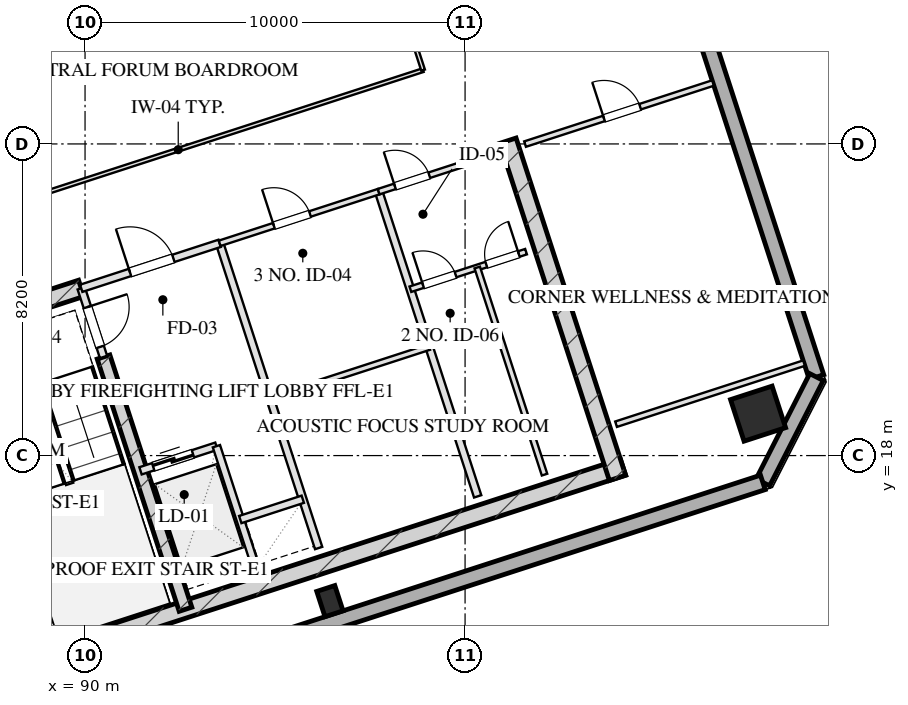
"""IFC4 building model, lengths in metres.
Left out: names, types, materials, properties, quantities, classifications, styles, units other than length and angle.
Written with IfcOpenShell. Run it as: python <this file> out.ifc"""

import sys

from ifc_helpers import new_model, si_unit, direction, frame, frame_2d, origin, origin_2d, place, context, subcontext, project, spatial, rectangle, hollow_rectangle, extrude, element, fill, save


model = new_model("IFC4")
c1 = context("Model", 3, precision=1e-05, world=origin(), true_north=direction((0.0, 1.0)))
c2 = subcontext(c1, "Body", "Model", "MODEL_VIEW")
j1 = project(units=[si_unit("LENGTHUNIT", "METRE"), si_unit("PLANEANGLEUNIT", "RADIAN")], contexts=[c1])
p1 = place(None, origin())
s1 = spatial("IfcSite", under=j1, at=p1, CompositionType="ELEMENT")
p2 = place(p1, origin())
s2 = spatial("IfcBuilding", under=s1, at=p2, CompositionType="ELEMENT")
p3 = place(p2, frame((0.0, 0.0, 209.3)))
s3 = spatial("IfcBuildingStorey", under=s2, at=p3, CompositionType="ELEMENT", Elevation=209.3)
p4 = place(p3, frame((88.701, 12.675, 0.0), z_axis=(0.0, 0.0, 1.0), x_axis=(0.95105824505, 0.309011673763, 0.0)))
e1 = element("IfcWall", 1, at=p4, inside=s3, PredefinedType="SHEAR", context=c2, shape_type="SweptSolid", body=[
    extrude(rectangle(XDim=16.25, YDim=0.45, at=frame_2d((8.125, 0.0))), origin(), (0.0, 0.0, 1.0), 3.45),
])
for number, where, z_axis, x_axis in (
    (2, (86.102, 21.404, 0.0), (0.0, 0.0, 1.0), (0.309, -0.951, 0.0)),
    (3, (101.128, 26.286, 0.0), (0.0, 0.0, 1.0), (0.309, -0.951, 0.0)),
):
    element("IfcWall", number, at=place(p3, frame(where, z_axis=z_axis, x_axis=x_axis)), inside=s3, PredefinedType="SHEAR", context=c2, shape_type="SweptSolid", body=[
        extrude(rectangle(XDim=9.33, YDim=0.45, at=frame_2d((4.665, 0.0))), origin(), (0.0, 0.0, 1.0), 3.45),
    ])
p5 = place(p3, frame((90.486, 20.594, 0.0), z_axis=(0.0, 0.0, 1.0), x_axis=(0.309020428229, -0.951055400562, 0.0)))
e4 = element("IfcWall", 4, at=p5, inside=s3, PredefinedType="SHEAR", context=c2, shape_type="SweptSolid", body=[
    extrude(rectangle(XDim=6.98, YDim=0.35, at=frame_2d((3.49, 0.0))), origin(), (0.0, 0.0, 1.0), 3.45),
])
p6 = place(p3, frame((85.957, 21.12, 0.0), z_axis=(0.0, 0.0, 1.0), x_axis=(0.951064796122, 0.308991510526, 0.0)))
e5 = element("IfcWall", 5, at=p6, inside=s3, PredefinedType="SHEAR", context=c2, shape_type="SweptSolid", body=[
    extrude(rectangle(XDim=4.145, YDim=0.45, at=frame_2d((2.073, 0.0))), origin(), (0.0, 0.0, 1.0), 3.45),
])
p7 = place(p3, frame((107.71, 19.104, 0.0), z_axis=(0.0, 0.0, 1.0), x_axis=(0.951056516295, 0.309016994375, 0.0)))
e6 = element("IfcColumn", 6, at=p7, inside=s3, PredefinedType="COLUMN", context=c2, shape_type="SweptSolid", body=[
    extrude(hollow_rectangle(XDim=1.15, YDim=1.15, WallThickness=0.04, at=origin_2d()), origin(), (0.0, 0.0, 1.0), 3.451),
])
p8 = place(p3, frame((96.443, 14.17, 0.0), z_axis=(0.0, 0.0, 1.0), x_axis=(0.951056516295, 0.309016994375, 0.0)))
e7 = element("IfcColumn", 7, at=p8, inside=s3, PredefinedType="COLUMN", context=c2, shape_type="SweptSolid", body=[
    extrude(hollow_rectangle(XDim=0.5, YDim=0.7, WallThickness=0.025, at=origin_2d()), origin(), (0.0, 0.0, 1.0), 3.451),
])
p9 = place(p3, frame((97.382, 56.586, 0.0), z_axis=(0.0, 0.0, 1.0), x_axis=(0.309016491071, -0.951056679828, 0.0)))
e8 = element("IfcWall", 8, at=p9, inside=s3, PredefinedType="SOLIDWALL", context=c2, shape_type="SweptSolid", body=[
    extrude(rectangle(XDim=38.4, YDim=0.4, at=frame_2d((19.2, 0.0))), origin(), (0.0, 0.0, 1.0), 2.61),
])
p10 = place(p9, frame((15.55, 0.0, 0.75)))
e9 = element("IfcOpeningElement", 9, at=p10, cuts=e8, PredefinedType="OPENING", context=c2, shape_type="SweptSolid", body=[
    extrude(rectangle(XDim=2.1, YDim=1.46, at=frame_2d((1.05, 0.73))), frame((0.0, 0.21, 0.0), z_axis=(0.0, -1.0, 0.0), x_axis=(1.0, 0.0, 0.0)), (0.0, 0.0, 1.0), 0.42),
])
p11 = place(p9, frame((11.75, 0.0, 0.75)))
e10 = element("IfcOpeningElement", 10, at=p11, cuts=e8, PredefinedType="OPENING", context=c2, shape_type="SweptSolid", body=[
    extrude(rectangle(XDim=2.1, YDim=1.46, at=frame_2d((1.05, 0.73))), frame((0.0, 0.21, 0.0), z_axis=(0.0, -1.0, 0.0), x_axis=(1.0, 0.0, 0.0)), (0.0, 0.0, 1.0), 0.42),
])
p12 = place(p9, frame((23.05, 0.0, 0.0)))
e11 = element("IfcOpeningElement", 11, at=p12, cuts=e8, PredefinedType="OPENING", context=c2, shape_type="SweptSolid", body=[
    extrude(rectangle(XDim=1.1, YDim=2.15, at=frame_2d((0.55, 1.075))), frame((0.0, 0.21, 0.0), z_axis=(0.0, -1.0, 0.0), x_axis=(1.0, 0.0, 0.0)), (0.0, 0.0, 1.0), 0.42),
])
p13 = place(p3, frame((109.248, 20.066, 0.0), z_axis=(0.0, 0.0, 1.0), x_axis=(-0.453949291228, -0.891027519774, 0.0)))
e12 = element("IfcWall", 12, at=p13, inside=s3, PredefinedType="SOLIDWALL", context=c2, shape_type="SweptSolid", body=[
    extrude(rectangle(XDim=3.111, YDim=0.4, at=frame_2d((1.556, 0.0))), origin(), (0.0, 0.0, 1.0), 2.61),
])
p14 = place(p3, frame((107.835, 17.294, 0.0), z_axis=(0.0, 0.0, 1.0), x_axis=(-0.951058012937, -0.309012388148, 0.0)))
e13 = element("IfcWall", 13, at=p14, inside=s3, PredefinedType="SOLIDWALL", context=c2, shape_type="SweptSolid", body=[
    extrude(rectangle(XDim=23.6, YDim=0.4, at=frame_2d((11.8, 0.0))), origin(), (0.0, 0.0, 1.0), 2.61),
])
p15 = place(p3, frame((89.899, 22.401, 0.0), z_axis=(0.0, 0.0, 1.0), x_axis=(0.308932062672, -0.951084108086, 0.0)))
e14 = element("IfcWall", 14, at=p15, inside=s3, PredefinedType="PARTITIONING", context=c2, shape_type="SweptSolid", body=[
    extrude(rectangle(XDim=1.9, YDim=0.2, at=frame_2d((0.95, 0.0))), origin(), (0.0, 0.0, 1.0), 3.175),
])
p16 = place(p15, frame((0.52, 0.0, 0.0)))
e15 = element("IfcOpeningElement", 15, at=p16, cuts=e14, PredefinedType="OPENING", context=c2, shape_type="SweptSolid", body=[
    extrude(rectangle(XDim=1.1, YDim=2.05, at=frame_2d((0.55, 1.025))), frame((0.0, 0.11, 0.0), z_axis=(0.0, -1.0, 0.0), x_axis=(1.0, 0.0, 0.0)), (0.0, 0.0, 1.0), 0.22),
])
p17 = place(p3, frame((93.542, 23.585, 0.0), z_axis=(0.0, 0.0, 1.0), x_axis=(0.309042196757, -0.951048327176, 0.0)))
e16 = element("IfcWall", 16, at=p17, inside=s3, PredefinedType="PARTITIONING", context=c2, shape_type="SweptSolid", body=[
    extrude(rectangle(XDim=8.43, YDim=0.2, at=frame_2d((4.215, 0.0))), origin(), (0.0, 0.0, 1.0), 3.175),
])
p18 = place(p3, frame((89.899, 22.401, 0.0), z_axis=(0.0, 0.0, 1.0), x_axis=(0.951046716504, 0.309047153403, 0.0)))
e17 = element("IfcWall", 17, at=p18, inside=s3, PredefinedType="PARTITIONING", context=c2, shape_type="SweptSolid", body=[
    extrude(rectangle(XDim=3.83, YDim=0.2, at=frame_2d((1.915, 0.0))), origin(), (0.0, 0.0, 1.0), 3.175),
])
p19 = place(p18, frame((1.35, 0.0, 0.0)))
e18 = element("IfcOpeningElement", 18, at=p19, cuts=e17, PredefinedType="OPENING", context=c2, shape_type="SweptSolid", body=[
    extrude(rectangle(XDim=1.2, YDim=2.05, at=frame_2d((0.6, 1.025))), frame((0.0, 0.11, 0.0), z_axis=(0.0, -1.0, 0.0), x_axis=(1.0, 0.0, 0.0)), (0.0, 0.0, 1.0), 0.22),
])
p20 = place(p3, frame((91.46, 17.598, 0.0), z_axis=(0.0, 0.0, 1.0), x_axis=(0.951062257173, 0.308999325213, 0.0)))
e19 = element("IfcWall", 19, at=p20, inside=s3, PredefinedType="PARTITIONING", context=c2, shape_type="SweptSolid", body=[
    extrude(rectangle(XDim=2.1, YDim=0.2, at=frame_2d((1.05, 0.0))), origin(), (0.0, 0.0, 1.0), 3.175),
])
p21 = place(p20, frame((0.35, 0.0, 0.0)))
e20 = element("IfcOpeningElement", 20, at=p21, cuts=e19, PredefinedType="OPENING", context=c2, shape_type="SweptSolid", body=[
    extrude(rectangle(XDim=1.1, YDim=2.05, at=frame_2d((0.55, 1.025))), frame((0.0, 0.11, 0.0), z_axis=(0.0, -1.0, 0.0), x_axis=(1.0, 0.0, 0.0)), (0.0, 0.0, 1.0), 0.22),
])
p22 = place(p3, frame((93.457, 18.247, 0.0), z_axis=(0.0, 0.0, 1.0), x_axis=(0.3089935693, -0.951064127245, 0.0)))
e21 = element("IfcWall", 21, at=p22, inside=s3, PredefinedType="PARTITIONING", context=c2, shape_type="SweptSolid", body=[
    extrude(rectangle(XDim=3.7, YDim=0.2, at=frame_2d((1.85, 0.0))), origin(), (0.0, 0.0, 1.0), 3.175),
])
p23 = place(p3, frame((94.084, 16.317, 0.0), z_axis=(0.0, 0.0, 1.0), x_axis=(0.951041328149, 0.309063734775, 0.0)))
e22 = element("IfcWall", 22, at=p23, inside=s3, PredefinedType="PARTITIONING", context=c2, shape_type="SweptSolid", body=[
    extrude(rectangle(XDim=1.73, YDim=0.2, at=frame_2d((0.865, 0.0))), origin(), (0.0, 0.0, 1.0), 3.175),
])
p24 = place(p3, frame((97.727, 24.944, 0.0), z_axis=(0.0, 0.0, 1.0), x_axis=(0.309016001439, -0.951056838919, 0.0)))
e23 = element("IfcWall", 23, at=p24, inside=s3, PredefinedType="PARTITIONING", context=c2, shape_type="SweptSolid", body=[
    extrude(rectangle(XDim=8.43, YDim=0.2, at=frame_2d((4.215, 0.0))), origin(), (0.0, 0.0, 1.0), 3.175),
])
p25 = place(p3, frame((93.542, 23.585, 0.0), z_axis=(0.0, 0.0, 1.0), x_axis=(0.951063829732, 0.308994485023, 0.0)))
e24 = element("IfcWall", 24, at=p25, inside=s3, PredefinedType="PARTITIONING", context=c2, shape_type="SweptSolid", body=[
    extrude(rectangle(XDim=4.4, YDim=0.15, at=frame_2d((2.2, 0.0))), origin(), (0.0, 0.0, 1.0), 3.175),
])
p26 = place(p25, frame((1.5, 0.0, 0.0)))
e25 = element("IfcOpeningElement", 25, at=p26, cuts=e24, PredefinedType="OPENING", context=c2, shape_type="SweptSolid", body=[
    extrude(rectangle(XDim=1.0, YDim=2.05, at=frame_2d((0.5, 1.025))), frame((0.0, 0.085, 0.0), z_axis=(0.0, -1.0, 0.0), x_axis=(1.0, 0.0, 0.0)), (0.0, 0.0, 1.0), 0.17),
])
p27 = place(p3, frame((94.871, 19.495, 0.0), z_axis=(0.0, 0.0, 1.0), x_axis=(0.951042223598, 0.309060979314, 0.0)))
e26 = element("IfcWall", 26, at=p27, inside=s3, PredefinedType="PARTITIONING", context=c2, shape_type="SweptSolid", body=[
    extrude(rectangle(XDim=4.4, YDim=0.15, at=frame_2d((2.2, 0.0))), origin(), (0.0, 0.0, 1.0), 3.175),
])
p28 = place(p3, frame((97.727, 24.944, 0.0), z_axis=(0.0, 0.0, 1.0), x_axis=(0.951036872128, 0.309077446369, 0.0)))
e27 = element("IfcWall", 27, at=p28, inside=s3, PredefinedType="PARTITIONING", context=c2, shape_type="SweptSolid", body=[
    extrude(rectangle(XDim=3.2, YDim=0.15, at=frame_2d((1.6, 0.0))), origin(), (0.0, 0.0, 1.0), 3.175),
])
p29 = place(p28, frame((0.45, 0.0, 0.0)))
e28 = element("IfcOpeningElement", 28, at=p29, cuts=e27, PredefinedType="OPENING", context=c2, shape_type="SweptSolid", body=[
    extrude(rectangle(XDim=0.95, YDim=2.05, at=frame_2d((0.475, 1.025))), frame((0.0, 0.085, 0.0), z_axis=(0.0, -1.0, 0.0), x_axis=(1.0, 0.0, 0.0)), (0.0, 0.0, 1.0), 0.17),
])
p30 = place(p3, frame((98.561, 22.376, 0.0), z_axis=(0.0, 0.0, 1.0), x_axis=(0.95104415986, 0.309055020985, 0.0)))
e29 = element("IfcWall", 29, at=p30, inside=s3, PredefinedType="PARTITIONING", context=c2, shape_type="SweptSolid", body=[
    extrude(rectangle(XDim=3.2, YDim=0.15, at=frame_2d((1.6, 0.0))), origin(), (0.0, 0.0, 1.0), 3.175),
])
p31 = place(p30, frame((0.35, 0.0, 0.0)))
e30 = element("IfcOpeningElement", 30, at=p31, cuts=e29, PredefinedType="OPENING", context=c2, shape_type="SweptSolid", body=[
    extrude(rectangle(XDim=0.9, YDim=2.05, at=frame_2d((0.45, 1.025))), frame((0.0, 0.085, 0.0), z_axis=(0.0, -1.0, 0.0), x_axis=(1.0, 0.0, 0.0)), (0.0, 0.0, 1.0), 0.17),
])
p32 = place(p30, frame((2.1, 0.0, 0.0)))
e31 = element("IfcOpeningElement", 31, at=p32, cuts=e29, PredefinedType="OPENING", context=c2, shape_type="SweptSolid", body=[
    extrude(rectangle(XDim=0.9, YDim=2.05, at=frame_2d((0.45, 1.025))), frame((0.0, 0.085, 0.0), z_axis=(0.0, -1.0, 0.0), x_axis=(1.0, 0.0, 0.0)), (0.0, 0.0, 1.0), 0.17),
])
p33 = place(p3, frame((100.32, 22.948, 0.0), z_axis=(0.0, 0.0, 1.0), x_axis=(0.309035009867, -0.951050662518, 0.0)))
e32 = element("IfcWall", 32, at=p33, inside=s3, PredefinedType="PARTITIONING", context=c2, shape_type="SweptSolid", body=[
    extrude(rectangle(XDim=5.73, YDim=0.15, at=frame_2d((2.865, 0.0))), origin(), (0.0, 0.0, 1.0), 3.175),
])
p34 = place(p3, frame((103.973, 18.825, 0.0), z_axis=(0.0, 0.0, 1.0), x_axis=(0.951055112834, 0.309021313752, 0.0)))
e33 = element("IfcWall", 33, at=p34, inside=s3, PredefinedType="PARTITIONING", context=c2, shape_type="SweptSolid", body=[
    extrude(rectangle(XDim=5.2, YDim=0.15, at=frame_2d((2.6, 0.0))), origin(), (0.0, 0.0, 1.0), 3.175),
])
p35 = place(p3, frame((101.578, 26.196, 0.0), z_axis=(0.0, 0.0, 1.0), x_axis=(0.951064427824, 0.308992644131, 0.0)))
e34 = element("IfcWall", 34, at=p35, inside=s3, PredefinedType="PARTITIONING", context=c2, shape_type="SweptSolid", body=[
    extrude(rectangle(XDim=5.2, YDim=0.15, at=frame_2d((2.6, 0.0))), origin(), (0.0, 0.0, 1.0), 3.175),
])
p36 = place(p35, frame((2.184, 0.0, 0.0)))
e35 = element("IfcOpeningElement", 35, at=p36, cuts=e34, PredefinedType="OPENING", context=c2, shape_type="SweptSolid", body=[
    extrude(rectangle(XDim=1.0, YDim=2.05, at=frame_2d((0.5, 1.025))), frame((0.0, 0.085, 0.0), z_axis=(0.0, -1.0, 0.0), x_axis=(1.0, 0.0, 0.0)), (0.0, 0.0, 1.0), 0.17),
])
p37 = place(p3, frame((86.009, 23.955, 0.0), z_axis=(0.0, 0.0, 1.0), x_axis=(0.951059488241, 0.309007847517, 0.0)))
e36 = element("IfcWall", 36, at=p37, inside=s3, PredefinedType="MOVABLE", context=c2, shape_type="SweptSolid", body=[
    extrude(rectangle(XDim=13.55, YDim=0.1, at=frame_2d((6.775, 0.0))), origin(), (0.0, 0.0, 1.0), 3.175),
])
p38 = place(p3, frame((98.896, 28.142, 0.0), z_axis=(0.0, 0.0, 1.0), x_axis=(-0.30901773025, 0.951056277195, 0.0)))
e37 = element("IfcWall", 37, at=p38, inside=s3, PredefinedType="MOVABLE", context=c2, shape_type="SweptSolid", body=[
    extrude(rectangle(XDim=16.64, YDim=0.1, at=frame_2d((8.32, 0.0))), origin(), (0.0, 0.0, 1.0), 3.175),
])
p39 = place(p38, frame((7.68, 0.0, 0.0)))
e38 = element("IfcOpeningElement", 38, at=p39, cuts=e37, PredefinedType="OPENING", context=c2, shape_type="SweptSolid", body=[
    extrude(rectangle(XDim=1.1, YDim=2.05, at=frame_2d((0.55, 1.025))), frame((0.0, 0.06, 0.0), z_axis=(0.0, -1.0, 0.0), x_axis=(1.0, 0.0, 0.0)), (0.0, 0.0, 1.0), 0.12),
])
p40 = place(p3, frame((84.674, 28.063, 0.0), z_axis=(0.0, 0.0, 1.0), x_axis=(0.951054192928, 0.309024144872, 0.0)))
e39 = element("IfcWall", 39, at=p40, inside=s3, PredefinedType="MOVABLE", context=c2, shape_type="SweptSolid", body=[
    extrude(rectangle(XDim=13.55, YDim=0.1, at=frame_2d((6.775, 0.0))), origin(), (0.0, 0.0, 1.0), 3.175),
])
p41 = place(p16, origin())
e40 = element("IfcDoor", 40, at=p41, inside=s3, OperationType="SINGLE_SWING_LEFT", PredefinedType="DOOR", context=c2, shape_type="SweptSolid", body=[
    extrude(rectangle(XDim=1.1, YDim=2.05, at=frame_2d((0.55, 1.025))), frame((0.0, 0.025, 0.0), z_axis=(0.0, -1.0, 0.0), x_axis=(1.0, 0.0, 0.0)), (0.0, 0.0, 1.0), 0.05),
])
fill(e15, e40)
p42 = place(p19, origin())
e41 = element("IfcDoor", 41, at=p42, inside=s3, OperationType="SINGLE_SWING_LEFT", PredefinedType="DOOR", context=c2, shape_type="SweptSolid", body=[
    extrude(rectangle(XDim=1.2, YDim=2.05, at=frame_2d((0.6, 1.025))), frame((0.0, 0.025, 0.0), z_axis=(0.0, -1.0, 0.0), x_axis=(1.0, 0.0, 0.0)), (0.0, 0.0, 1.0), 0.05),
])
fill(e18, e41)
p43 = place(p21, origin())
e42 = element("IfcDoor", 42, at=p43, inside=s3, OperationType="DOUBLE_DOOR_SLIDING", PredefinedType="DOOR", context=c2, shape_type="SweptSolid", body=[
    extrude(rectangle(XDim=1.1, YDim=2.05, at=frame_2d((0.55, 1.025))), frame((0.0, 0.025, 0.0), z_axis=(0.0, -1.0, 0.0), x_axis=(1.0, 0.0, 0.0)), (0.0, 0.0, 1.0), 0.05),
])
fill(e20, e42)
p44 = place(p26, origin())
e43 = element("IfcDoor", 43, at=p44, inside=s3, OperationType="SINGLE_SWING_LEFT", PredefinedType="DOOR", context=c2, shape_type="SweptSolid", body=[
    extrude(rectangle(XDim=1.0, YDim=2.05, at=frame_2d((0.5, 1.025))), frame((0.0, 0.025, 0.0), z_axis=(0.0, -1.0, 0.0), x_axis=(1.0, 0.0, 0.0)), (0.0, 0.0, 1.0), 0.05),
])
fill(e25, e43)
p45 = place(p29, origin())
e44 = element("IfcDoor", 44, at=p45, inside=s3, OperationType="SINGLE_SWING_LEFT", PredefinedType="DOOR", context=c2, shape_type="SweptSolid", body=[
    extrude(rectangle(XDim=0.95, YDim=2.05, at=frame_2d((0.475, 1.025))), frame((0.0, 0.025, 0.0), z_axis=(0.0, -1.0, 0.0), x_axis=(1.0, 0.0, 0.0)), (0.0, 0.0, 1.0), 0.05),
])
fill(e28, e44)
p46 = place(p31, origin())
e45 = element("IfcDoor", 45, at=p46, inside=s3, OperationType="SINGLE_SWING_LEFT", PredefinedType="DOOR", context=c2, shape_type="SweptSolid", body=[
    extrude(rectangle(XDim=0.9, YDim=2.05, at=frame_2d((0.45, 1.025))), frame((0.0, 0.025, 0.0), z_axis=(0.0, -1.0, 0.0), x_axis=(1.0, 0.0, 0.0)), (0.0, 0.0, 1.0), 0.05),
])
fill(e30, e45)
p47 = place(p32, origin())
e46 = element("IfcDoor", 46, at=p47, inside=s3, OperationType="SINGLE_SWING_RIGHT", PredefinedType="DOOR", context=c2, shape_type="SweptSolid", body=[
    extrude(rectangle(XDim=0.9, YDim=2.05, at=frame_2d((0.45, 1.025))), frame((0.0, 0.025, 0.0), z_axis=(0.0, -1.0, 0.0), x_axis=(1.0, 0.0, 0.0)), (0.0, 0.0, 1.0), 0.05),
])
fill(e31, e46)
p48 = place(p36, origin())
e47 = element("IfcDoor", 47, at=p48, inside=s3, OperationType="SINGLE_SWING_LEFT", PredefinedType="DOOR", context=c2, shape_type="SweptSolid", body=[
    extrude(rectangle(XDim=1.0, YDim=2.05, at=frame_2d((0.5, 1.025))), frame((0.0, 0.025, 0.0), z_axis=(0.0, -1.0, 0.0), x_axis=(1.0, 0.0, 0.0)), (0.0, 0.0, 1.0), 0.05),
])
fill(e35, e47)
save(model, sys.argv[1])
